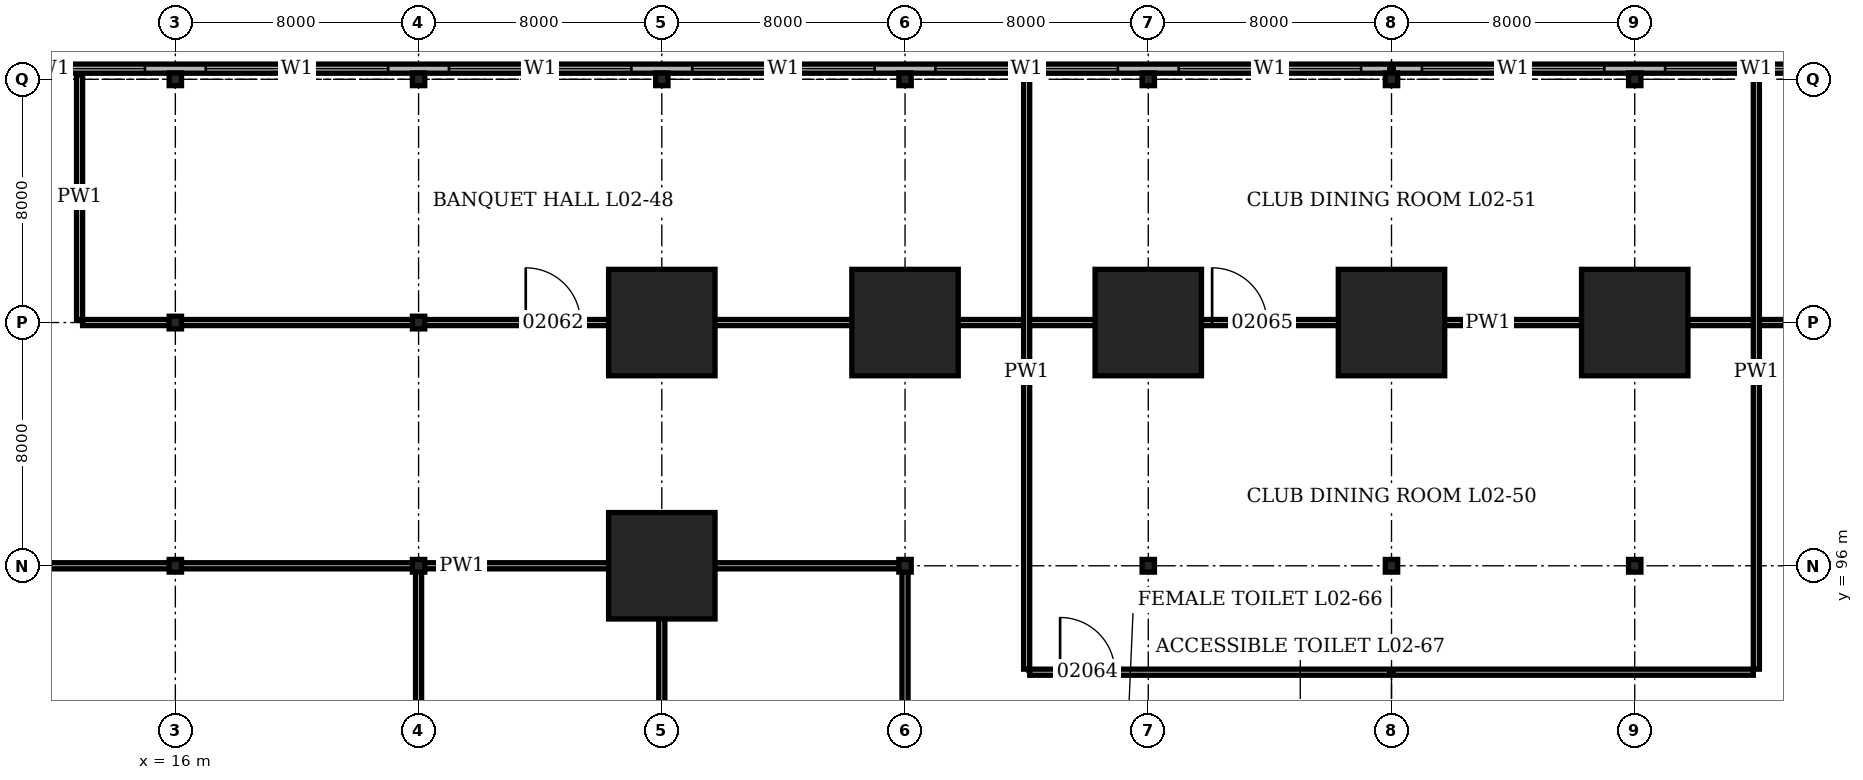
"""IFC4 building model, lengths in metres.
Left out: names, types, materials, properties, quantities, classifications, styles, units other than length and angle.
Written with IfcOpenShell. Run it as: python <this file> out.ifc"""

import sys

from ifc_helpers import new_model, si_unit, direction, frame, frame_2d, origin, origin_2d, place, context, subcontext, project, spatial, rectangle, hollow_rectangle, i_section, extrude, element, fill, save


model = new_model("IFC4")
c1 = context("Model", 3, precision=1e-05, world=origin(), true_north=direction((0.0, 1.0)))
c2 = subcontext(c1, "Body", "Model", "MODEL_VIEW")
j1 = project(units=[si_unit("LENGTHUNIT", "METRE"), si_unit("PLANEANGLEUNIT", "RADIAN")], contexts=[c1])
p1 = place(None, origin())
s1 = spatial("IfcSite", under=j1, at=p1, CompositionType="ELEMENT")
p2 = place(p1, origin())
s2 = spatial("IfcBuilding", under=s1, at=p2, CompositionType="ELEMENT")
p3 = place(p2, frame((0.0, 0.0, 9.9)))
s3 = spatial("IfcBuildingStorey", under=s2, at=p3, CompositionType="ELEMENT", Elevation=9.9)
for number, where, z_axis, x_axis in (
    (1, (16.0, 96.0, 0.0), (0.0, 0.0, 1.0), (1.0, 0.0, 0.0)),
    (2, (16.0, 104.0, 0.0), (0.0, 0.0, 1.0), (1.0, 0.0, 0.0)),
    (3, (16.0, 112.0, 0.0), (0.0, 0.0, 1.0), (1.0, 0.0, 0.0)),
    (4, (24.0, 96.0, 0.0), (0.0, 0.0, 1.0), (1.0, 0.0, 0.0)),
    (5, (24.0, 104.0, 0.0), (0.0, 0.0, 1.0), (1.0, 0.0, 0.0)),
    (6, (24.0, 112.0, 0.0), (0.0, 0.0, 1.0), (1.0, 0.0, 0.0)),
):
    element("IfcColumn", number, at=place(p3, frame(where, z_axis=z_axis, x_axis=x_axis)), inside=s3, PredefinedType="COLUMN", context=c2, shape_type="SweptSolid", body=[
        extrude(i_section(OverallWidth=0.406, OverallDepth=0.417, WebThickness=0.03, FlangeThickness=0.048, at=origin_2d()), origin(), (0.0, 0.0, 1.0), 5.0),
    ])
for number, where, z_axis, x_axis in (
    (7, (32.0, 96.0, 0.0), (0.0, 0.0, 1.0), (1.0, 0.0, 0.0)),
    (8, (32.0, 104.0, 0.0), (0.0, 0.0, 1.0), (1.0, 0.0, 0.0)),
):
    element("IfcColumn", number, at=place(p3, frame(where, z_axis=z_axis, x_axis=x_axis)), inside=s3, PredefinedType="COLUMN", context=c2, shape_type="SweptSolid", body=[
        extrude(hollow_rectangle(XDim=3.5, YDim=3.5, WallThickness=0.5, at=origin_2d()), origin(), (0.0, 0.0, 1.0), 5.0),
    ])
for number, where, z_axis, x_axis in (
    (9, (32.0, 112.0, 0.0), (0.0, 0.0, 1.0), (1.0, 0.0, 0.0)),
    (10, (40.0, 96.0, 0.0), (0.0, 0.0, 1.0), (1.0, 0.0, 0.0)),
):
    element("IfcColumn", number, at=place(p3, frame(where, z_axis=z_axis, x_axis=x_axis)), inside=s3, PredefinedType="COLUMN", context=c2, shape_type="SweptSolid", body=[
        extrude(i_section(OverallWidth=0.406, OverallDepth=0.417, WebThickness=0.03, FlangeThickness=0.048, at=origin_2d()), origin(), (0.0, 0.0, 1.0), 5.0),
    ])
p4 = place(p3, frame((40.0, 104.0, 0.0), z_axis=(0.0, 0.0, 1.0), x_axis=(1.0, 0.0, 0.0)))
e11 = element("IfcColumn", 11, at=p4, inside=s3, PredefinedType="COLUMN", context=c2, shape_type="SweptSolid", body=[
    extrude(hollow_rectangle(XDim=3.5, YDim=3.5, WallThickness=0.5, at=origin_2d()), origin(), (0.0, 0.0, 1.0), 5.0),
])
for number, where, z_axis, x_axis in (
    (12, (40.0, 112.0, 0.0), (0.0, 0.0, 1.0), (1.0, 0.0, 0.0)),
    (13, (48.0, 96.0, 0.0), (0.0, 0.0, 1.0), (1.0, 0.0, 0.0)),
):
    element("IfcColumn", number, at=place(p3, frame(where, z_axis=z_axis, x_axis=x_axis)), inside=s3, PredefinedType="COLUMN", context=c2, shape_type="SweptSolid", body=[
        extrude(i_section(OverallWidth=0.406, OverallDepth=0.417, WebThickness=0.03, FlangeThickness=0.048, at=origin_2d()), origin(), (0.0, 0.0, 1.0), 5.0),
    ])
p5 = place(p3, frame((48.0, 104.0, 0.0), z_axis=(0.0, 0.0, 1.0), x_axis=(1.0, 0.0, 0.0)))
e14 = element("IfcColumn", 14, at=p5, inside=s3, PredefinedType="COLUMN", context=c2, shape_type="SweptSolid", body=[
    extrude(hollow_rectangle(XDim=3.5, YDim=3.5, WallThickness=0.5, at=origin_2d()), origin(), (0.0, 0.0, 1.0), 5.0),
])
for number, where, z_axis, x_axis in (
    (15, (48.0, 112.0, 0.0), (0.0, 0.0, 1.0), (1.0, 0.0, 0.0)),
    (16, (56.0, 96.0, 0.0), (0.0, 0.0, 1.0), (1.0, 0.0, 0.0)),
):
    element("IfcColumn", number, at=place(p3, frame(where, z_axis=z_axis, x_axis=x_axis)), inside=s3, PredefinedType="COLUMN", context=c2, shape_type="SweptSolid", body=[
        extrude(i_section(OverallWidth=0.406, OverallDepth=0.417, WebThickness=0.03, FlangeThickness=0.048, at=origin_2d()), origin(), (0.0, 0.0, 1.0), 5.0),
    ])
p6 = place(p3, frame((56.0, 104.0, 0.0), z_axis=(0.0, 0.0, 1.0), x_axis=(1.0, 0.0, 0.0)))
e17 = element("IfcColumn", 17, at=p6, inside=s3, PredefinedType="COLUMN", context=c2, shape_type="SweptSolid", body=[
    extrude(hollow_rectangle(XDim=3.5, YDim=3.5, WallThickness=0.5, at=origin_2d()), origin(), (0.0, 0.0, 1.0), 5.0),
])
for number, where, z_axis, x_axis in (
    (18, (56.0, 112.0, 0.0), (0.0, 0.0, 1.0), (1.0, 0.0, 0.0)),
    (19, (64.0, 96.0, 0.0), (0.0, 0.0, 1.0), (1.0, 0.0, 0.0)),
):
    element("IfcColumn", number, at=place(p3, frame(where, z_axis=z_axis, x_axis=x_axis)), inside=s3, PredefinedType="COLUMN", context=c2, shape_type="SweptSolid", body=[
        extrude(i_section(OverallWidth=0.406, OverallDepth=0.417, WebThickness=0.03, FlangeThickness=0.048, at=origin_2d()), origin(), (0.0, 0.0, 1.0), 5.0),
    ])
p7 = place(p3, frame((64.0, 104.0, 0.0), z_axis=(0.0, 0.0, 1.0), x_axis=(1.0, 0.0, 0.0)))
e20 = element("IfcColumn", 20, at=p7, inside=s3, PredefinedType="COLUMN", context=c2, shape_type="SweptSolid", body=[
    extrude(hollow_rectangle(XDim=3.5, YDim=3.5, WallThickness=0.5, at=origin_2d()), origin(), (0.0, 0.0, 1.0), 5.0),
])
p8 = place(p3, frame((64.0, 112.0, 0.0), z_axis=(0.0, 0.0, 1.0), x_axis=(1.0, 0.0, 0.0)))
e21 = element("IfcColumn", 21, at=p8, inside=s3, PredefinedType="COLUMN", context=c2, shape_type="SweptSolid", body=[
    extrude(i_section(OverallWidth=0.406, OverallDepth=0.417, WebThickness=0.03, FlangeThickness=0.048, at=origin_2d()), origin(), (0.0, 0.0, 1.0), 5.0),
])
p9 = place(p3, frame((112.35, 112.35, 0.0), z_axis=(0.0, 0.0, 1.0), x_axis=(-1.0, 0.0, 0.0)))
e22 = element("IfcWall", 22, at=p9, inside=s3, PredefinedType="SOLIDWALL", context=c2, shape_type="SweptSolid", body=[
    extrude(rectangle(XDim=112.7, YDim=0.3, at=frame_2d((56.35, 0.0))), origin(), (0.0, 0.0, 1.0), 5.0),
])
p10 = place(p9, frame((1.35, 0.0, 1.0)))
e23 = element("IfcOpeningElement", 23, at=p10, cuts=e22, PredefinedType="OPENING", context=c2, shape_type="SweptSolid", body=[
    extrude(rectangle(XDim=6.0, YDim=1.5, at=frame_2d((3.0, 0.75))), frame((0.0, 0.16, 0.0), z_axis=(0.0, -1.0, 0.0), x_axis=(1.0, 0.0, 0.0)), (0.0, 0.0, 1.0), 0.32),
])
p11 = place(p9, frame((9.35, 0.0, 1.0)))
e24 = element("IfcOpeningElement", 24, at=p11, cuts=e22, PredefinedType="OPENING", context=c2, shape_type="SweptSolid", body=[
    extrude(rectangle(XDim=6.0, YDim=1.5, at=frame_2d((3.0, 0.75))), frame((0.0, 0.16, 0.0), z_axis=(0.0, -1.0, 0.0), x_axis=(1.0, 0.0, 0.0)), (0.0, 0.0, 1.0), 0.32),
])
p12 = place(p9, frame((17.35, 0.0, 1.0)))
e25 = element("IfcOpeningElement", 25, at=p12, cuts=e22, PredefinedType="OPENING", context=c2, shape_type="SweptSolid", body=[
    extrude(rectangle(XDim=6.0, YDim=1.5, at=frame_2d((3.0, 0.75))), frame((0.0, 0.16, 0.0), z_axis=(0.0, -1.0, 0.0), x_axis=(1.0, 0.0, 0.0)), (0.0, 0.0, 1.0), 0.32),
])
p13 = place(p9, frame((25.35, 0.0, 1.0)))
e26 = element("IfcOpeningElement", 26, at=p13, cuts=e22, PredefinedType="OPENING", context=c2, shape_type="SweptSolid", body=[
    extrude(rectangle(XDim=6.0, YDim=1.5, at=frame_2d((3.0, 0.75))), frame((0.0, 0.16, 0.0), z_axis=(0.0, -1.0, 0.0), x_axis=(1.0, 0.0, 0.0)), (0.0, 0.0, 1.0), 0.32),
])
p14 = place(p9, frame((33.35, 0.0, 1.0)))
e27 = element("IfcOpeningElement", 27, at=p14, cuts=e22, PredefinedType="OPENING", context=c2, shape_type="SweptSolid", body=[
    extrude(rectangle(XDim=6.0, YDim=1.5, at=frame_2d((3.0, 0.75))), frame((0.0, 0.16, 0.0), z_axis=(0.0, -1.0, 0.0), x_axis=(1.0, 0.0, 0.0)), (0.0, 0.0, 1.0), 0.32),
])
p15 = place(p9, frame((41.35, 0.0, 1.0)))
e28 = element("IfcOpeningElement", 28, at=p15, cuts=e22, PredefinedType="OPENING", context=c2, shape_type="SweptSolid", body=[
    extrude(rectangle(XDim=6.0, YDim=1.5, at=frame_2d((3.0, 0.75))), frame((0.0, 0.16, 0.0), z_axis=(0.0, -1.0, 0.0), x_axis=(1.0, 0.0, 0.0)), (0.0, 0.0, 1.0), 0.32),
])
p16 = place(p9, frame((49.35, 0.0, 1.0)))
e29 = element("IfcOpeningElement", 29, at=p16, cuts=e22, PredefinedType="OPENING", context=c2, shape_type="SweptSolid", body=[
    extrude(rectangle(XDim=6.0, YDim=1.5, at=frame_2d((3.0, 0.75))), frame((0.0, 0.16, 0.0), z_axis=(0.0, -1.0, 0.0), x_axis=(1.0, 0.0, 0.0)), (0.0, 0.0, 1.0), 0.32),
])
p17 = place(p9, frame((57.35, 0.0, 1.0)))
e30 = element("IfcOpeningElement", 30, at=p17, cuts=e22, PredefinedType="OPENING", context=c2, shape_type="SweptSolid", body=[
    extrude(rectangle(XDim=6.0, YDim=1.5, at=frame_2d((3.0, 0.75))), frame((0.0, 0.16, 0.0), z_axis=(0.0, -1.0, 0.0), x_axis=(1.0, 0.0, 0.0)), (0.0, 0.0, 1.0), 0.32),
])
p18 = place(p9, frame((65.35, 0.0, 1.0)))
e31 = element("IfcOpeningElement", 31, at=p18, cuts=e22, PredefinedType="OPENING", context=c2, shape_type="SweptSolid", body=[
    extrude(rectangle(XDim=6.0, YDim=1.5, at=frame_2d((3.0, 0.75))), frame((0.0, 0.16, 0.0), z_axis=(0.0, -1.0, 0.0), x_axis=(1.0, 0.0, 0.0)), (0.0, 0.0, 1.0), 0.32),
])
p19 = place(p9, frame((73.35, 0.0, 1.0)))
e32 = element("IfcOpeningElement", 32, at=p19, cuts=e22, PredefinedType="OPENING", context=c2, shape_type="SweptSolid", body=[
    extrude(rectangle(XDim=6.0, YDim=1.5, at=frame_2d((3.0, 0.75))), frame((0.0, 0.16, 0.0), z_axis=(0.0, -1.0, 0.0), x_axis=(1.0, 0.0, 0.0)), (0.0, 0.0, 1.0), 0.32),
])
p20 = place(p9, frame((81.35, 0.0, 1.0)))
e33 = element("IfcOpeningElement", 33, at=p20, cuts=e22, PredefinedType="OPENING", context=c2, shape_type="SweptSolid", body=[
    extrude(rectangle(XDim=6.0, YDim=1.5, at=frame_2d((3.0, 0.75))), frame((0.0, 0.16, 0.0), z_axis=(0.0, -1.0, 0.0), x_axis=(1.0, 0.0, 0.0)), (0.0, 0.0, 1.0), 0.32),
])
p21 = place(p9, frame((89.35, 0.0, 1.0)))
e34 = element("IfcOpeningElement", 34, at=p21, cuts=e22, PredefinedType="OPENING", context=c2, shape_type="SweptSolid", body=[
    extrude(rectangle(XDim=6.0, YDim=1.5, at=frame_2d((3.0, 0.75))), frame((0.0, 0.16, 0.0), z_axis=(0.0, -1.0, 0.0), x_axis=(1.0, 0.0, 0.0)), (0.0, 0.0, 1.0), 0.32),
])
p22 = place(p9, frame((97.35, 0.0, 1.0)))
e35 = element("IfcOpeningElement", 35, at=p22, cuts=e22, PredefinedType="OPENING", context=c2, shape_type="SweptSolid", body=[
    extrude(rectangle(XDim=6.0, YDim=1.5, at=frame_2d((3.0, 0.75))), frame((0.0, 0.16, 0.0), z_axis=(0.0, -1.0, 0.0), x_axis=(1.0, 0.0, 0.0)), (0.0, 0.0, 1.0), 0.32),
])
p23 = place(p9, frame((105.35, 0.0, 1.0)))
e36 = element("IfcOpeningElement", 36, at=p23, cuts=e22, PredefinedType="OPENING", context=c2, shape_type="SweptSolid", body=[
    extrude(rectangle(XDim=6.0, YDim=1.5, at=frame_2d((3.0, 0.75))), frame((0.0, 0.16, 0.0), z_axis=(0.0, -1.0, 0.0), x_axis=(1.0, 0.0, 0.0)), (0.0, 0.0, 1.0), 0.32),
])
p24 = place(p3, frame((44.1, 92.5, 0.0), z_axis=(0.0, 0.0, 1.0), x_axis=(1.0, 0.0, 0.0)))
e37 = element("IfcWall", 37, at=p24, inside=s3, PredefinedType="PARTITIONING", context=c2, shape_type="SweptSolid", body=[
    extrude(rectangle(XDim=23.8, YDim=0.2, at=frame_2d((11.9, 0.0))), origin(), (0.0, 0.0, 1.0), 4.8),
])
p25 = place(p24, frame((1.0, 0.0, 0.0)))
e38 = element("IfcOpeningElement", 38, at=p25, cuts=e37, PredefinedType="OPENING", context=c2, shape_type="SweptSolid", body=[
    extrude(rectangle(XDim=1.8, YDim=2.4, at=frame_2d((0.9, 1.2))), frame((0.0, 0.11, 0.0), z_axis=(0.0, -1.0, 0.0), x_axis=(1.0, 0.0, 0.0)), (0.0, 0.0, 1.0), 0.22),
])
p26 = place(p3, frame((10.95, 96.0, 0.0), z_axis=(0.0, 0.0, 1.0), x_axis=(1.0, 0.0, 0.0)))
e39 = element("IfcWall", 39, at=p26, inside=s3, PredefinedType="PARTITIONING", context=c2, shape_type="SweptSolid", body=[
    extrude(rectangle(XDim=28.95, YDim=0.2, at=frame_2d((14.475, 0.0))), origin(), (0.0, 0.0, 1.0), 4.028),
])
p27 = place(p3, frame((12.95, 104.0, 0.0), z_axis=(0.0, 0.0, 1.0), x_axis=(1.0, 0.0, 0.0)))
e40 = element("IfcWall", 40, at=p27, inside=s3, PredefinedType="PARTITIONING", context=c2, shape_type="SweptSolid", body=[
    extrude(rectangle(XDim=90.95, YDim=0.2, at=frame_2d((45.475, 0.0))), origin(), (0.0, 0.0, 1.0), 4.028),
])
p28 = place(p27, frame((14.575, 0.0, 0.0)))
e41 = element("IfcOpeningElement", 41, at=p28, cuts=e40, PredefinedType="OPENING", context=c2, shape_type="SweptSolid", body=[
    extrude(rectangle(XDim=1.8, YDim=2.4, at=frame_2d((0.9, 1.2))), frame((0.0, 0.11, 0.0), z_axis=(0.0, -1.0, 0.0), x_axis=(1.0, 0.0, 0.0)), (0.0, 0.0, 1.0), 0.22),
])
p29 = place(p27, frame((37.15, 0.0, 0.0)))
e42 = element("IfcOpeningElement", 42, at=p29, cuts=e40, PredefinedType="OPENING", context=c2, shape_type="SweptSolid", body=[
    extrude(rectangle(XDim=1.8, YDim=2.4, at=frame_2d((0.9, 1.2))), frame((0.0, 0.11, 0.0), z_axis=(0.0, -1.0, 0.0), x_axis=(1.0, 0.0, 0.0)), (0.0, 0.0, 1.0), 0.22),
])
p30 = place(p27, frame((72.55, 0.0, 0.0)))
e43 = element("IfcOpeningElement", 43, at=p30, cuts=e40, PredefinedType="OPENING", context=c2, shape_type="SweptSolid", body=[
    extrude(rectangle(XDim=1.0, YDim=2.1, at=frame_2d((0.5, 1.05))), frame((0.0, 0.11, 0.0), z_axis=(0.0, -1.0, 0.0), x_axis=(1.0, 0.0, 0.0)), (0.0, 0.0, 1.0), 0.22),
])
p31 = place(p3, frame((12.85, 104.1, 0.0), z_axis=(0.0, 0.0, 1.0), x_axis=(0.0, 1.0, 0.0)))
e44 = element("IfcWall", 44, at=p31, inside=s3, PredefinedType="PARTITIONING", context=c2, shape_type="SweptSolid", body=[
    extrude(rectangle(XDim=8.05, YDim=0.2, at=frame_2d((4.025, 0.0))), origin(), (0.0, 0.0, 1.0), 4.8),
])
for number, where, z_axis, x_axis in (
    (45, (24.0, 72.1, 0.0), (0.0, 0.0, 1.0), (0.0, 1.0, 0.0)),
    (46, (32.0, 72.1, 0.0), (0.0, 0.0, 1.0), (0.0, 1.0, 0.0)),
    (47, (40.0, 72.1, 0.0), (0.0, 0.0, 1.0), (0.0, 1.0, 0.0)),
):
    element("IfcWall", number, at=place(p3, frame(where, z_axis=z_axis, x_axis=x_axis)), inside=s3, PredefinedType="PARTITIONING", context=c2, shape_type="SweptSolid", body=[
        extrude(rectangle(XDim=23.8, YDim=0.2, at=frame_2d((11.9, 0.0))), origin(), (0.0, 0.0, 1.0), 4.028),
    ])
for number, where, z_axis, x_axis in (
    (48, (44.0, 92.6, 0.0), (0.0, 0.0, 1.0), (0.0, 1.0, 0.0)),
    (49, (68.0, 92.6, 0.0), (0.0, 0.0, 1.0), (0.0, 1.0, 0.0)),
):
    element("IfcWall", number, at=place(p3, frame(where, z_axis=z_axis, x_axis=x_axis)), inside=s3, PredefinedType="PARTITIONING", context=c2, shape_type="SweptSolid", body=[
        extrude(rectangle(XDim=19.55, YDim=0.2, at=frame_2d((9.775, 0.0))), origin(), (0.0, 0.0, 1.0), 4.8),
    ])
p32 = place(p15, origin())
e50 = element("IfcWindow", 50, at=p32, inside=s3, PartitioningType="SINGLE_PANEL", PredefinedType="WINDOW", context=c2, shape_type="SweptSolid", body=[
    extrude(rectangle(XDim=6.0, YDim=1.5, at=frame_2d((3.0, 0.75))), frame((0.0, 0.03, 0.0), z_axis=(0.0, -1.0, 0.0), x_axis=(1.0, 0.0, 0.0)), (0.0, 0.0, 1.0), 0.06),
])
fill(e28, e50)
p33 = place(p16, origin())
e51 = element("IfcWindow", 51, at=p33, inside=s3, PartitioningType="SINGLE_PANEL", PredefinedType="WINDOW", context=c2, shape_type="SweptSolid", body=[
    extrude(rectangle(XDim=6.0, YDim=1.5, at=frame_2d((3.0, 0.75))), frame((0.0, 0.03, 0.0), z_axis=(0.0, -1.0, 0.0), x_axis=(1.0, 0.0, 0.0)), (0.0, 0.0, 1.0), 0.06),
])
fill(e29, e51)
p34 = place(p17, origin())
e52 = element("IfcWindow", 52, at=p34, inside=s3, PartitioningType="SINGLE_PANEL", PredefinedType="WINDOW", context=c2, shape_type="SweptSolid", body=[
    extrude(rectangle(XDim=6.0, YDim=1.5, at=frame_2d((3.0, 0.75))), frame((0.0, 0.03, 0.0), z_axis=(0.0, -1.0, 0.0), x_axis=(1.0, 0.0, 0.0)), (0.0, 0.0, 1.0), 0.06),
])
fill(e30, e52)
p35 = place(p18, origin())
e53 = element("IfcWindow", 53, at=p35, inside=s3, PartitioningType="SINGLE_PANEL", PredefinedType="WINDOW", context=c2, shape_type="SweptSolid", body=[
    extrude(rectangle(XDim=6.0, YDim=1.5, at=frame_2d((3.0, 0.75))), frame((0.0, 0.03, 0.0), z_axis=(0.0, -1.0, 0.0), x_axis=(1.0, 0.0, 0.0)), (0.0, 0.0, 1.0), 0.06),
])
fill(e31, e53)
p36 = place(p19, origin())
e54 = element("IfcWindow", 54, at=p36, inside=s3, PartitioningType="SINGLE_PANEL", PredefinedType="WINDOW", context=c2, shape_type="SweptSolid", body=[
    extrude(rectangle(XDim=6.0, YDim=1.5, at=frame_2d((3.0, 0.75))), frame((0.0, 0.03, 0.0), z_axis=(0.0, -1.0, 0.0), x_axis=(1.0, 0.0, 0.0)), (0.0, 0.0, 1.0), 0.06),
])
fill(e32, e54)
p37 = place(p20, origin())
e55 = element("IfcWindow", 55, at=p37, inside=s3, PartitioningType="SINGLE_PANEL", PredefinedType="WINDOW", context=c2, shape_type="SweptSolid", body=[
    extrude(rectangle(XDim=6.0, YDim=1.5, at=frame_2d((3.0, 0.75))), frame((0.0, 0.03, 0.0), z_axis=(0.0, -1.0, 0.0), x_axis=(1.0, 0.0, 0.0)), (0.0, 0.0, 1.0), 0.06),
])
fill(e33, e55)
p38 = place(p21, origin())
e56 = element("IfcWindow", 56, at=p38, inside=s3, PartitioningType="SINGLE_PANEL", PredefinedType="WINDOW", context=c2, shape_type="SweptSolid", body=[
    extrude(rectangle(XDim=6.0, YDim=1.5, at=frame_2d((3.0, 0.75))), frame((0.0, 0.03, 0.0), z_axis=(0.0, -1.0, 0.0), x_axis=(1.0, 0.0, 0.0)), (0.0, 0.0, 1.0), 0.06),
])
fill(e34, e56)
p39 = place(p22, origin())
e57 = element("IfcWindow", 57, at=p39, inside=s3, PartitioningType="SINGLE_PANEL", PredefinedType="WINDOW", context=c2, shape_type="SweptSolid", body=[
    extrude(rectangle(XDim=6.0, YDim=1.5, at=frame_2d((3.0, 0.75))), frame((0.0, 0.03, 0.0), z_axis=(0.0, -1.0, 0.0), x_axis=(1.0, 0.0, 0.0)), (0.0, 0.0, 1.0), 0.06),
])
fill(e35, e57)
p40 = place(p28, origin())
e58 = element("IfcDoor", 58, at=p40, inside=s3, OperationType="DOUBLE_DOOR_DOUBLE_SWING", PredefinedType="DOOR", context=c2, shape_type="SweptSolid", body=[
    extrude(rectangle(XDim=1.8, YDim=2.4, at=frame_2d((0.9, 1.2))), frame((0.0, 0.1, 0.0), z_axis=(0.0, -1.0, 0.0), x_axis=(1.0, 0.0, 0.0)), (0.0, 0.0, 1.0), 0.199),
])
fill(e41, e58)
p41 = place(p25, origin())
e59 = element("IfcDoor", 59, at=p41, inside=s3, OperationType="DOUBLE_DOOR_DOUBLE_SWING", PredefinedType="DOOR", context=c2, shape_type="SweptSolid", body=[
    extrude(rectangle(XDim=1.8, YDim=2.4, at=frame_2d((0.9, 1.2))), frame((0.0, 0.1, 0.0), z_axis=(0.0, -1.0, 0.0), x_axis=(1.0, 0.0, 0.0)), (0.0, 0.0, 1.0), 0.199),
])
fill(e38, e59)
p42 = place(p29, origin())
e60 = element("IfcDoor", 60, at=p42, inside=s3, OperationType="DOUBLE_DOOR_DOUBLE_SWING", PredefinedType="DOOR", context=c2, shape_type="SweptSolid", body=[
    extrude(rectangle(XDim=1.8, YDim=2.4, at=frame_2d((0.9, 1.2))), frame((0.0, 0.1, 0.0), z_axis=(0.0, -1.0, 0.0), x_axis=(1.0, 0.0, 0.0)), (0.0, 0.0, 1.0), 0.199),
])
fill(e42, e60)
save(model, sys.argv[1])
